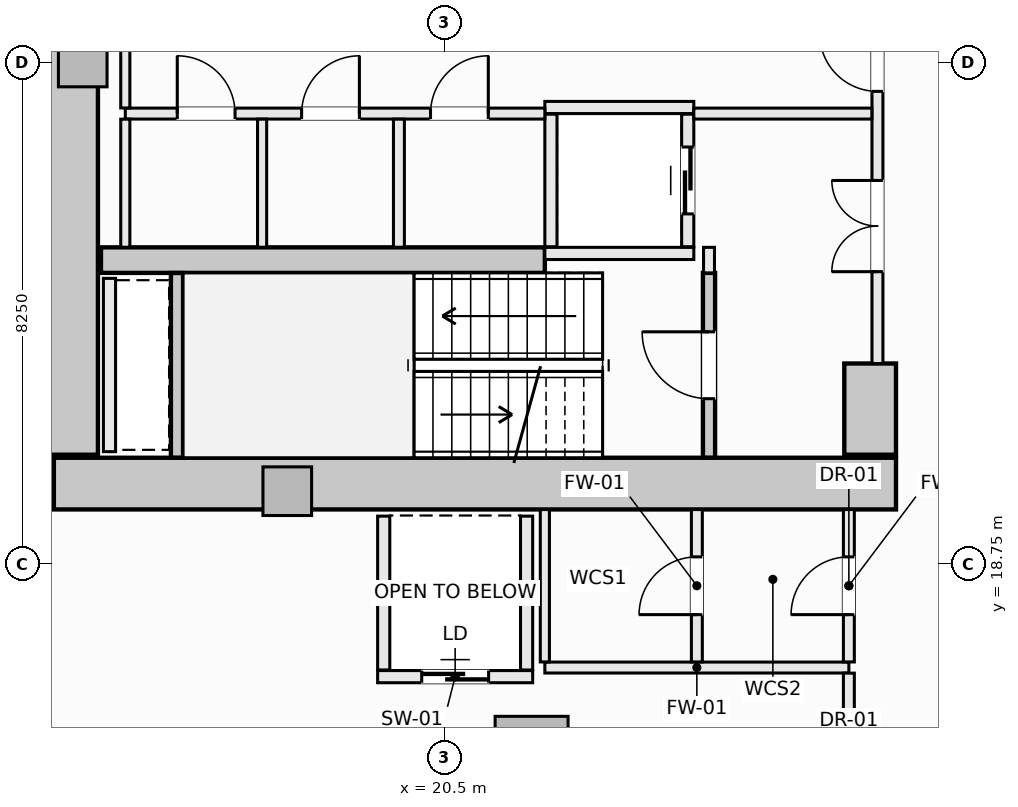
"""IFC4 building model, lengths in metres.
Left out: names, types, materials, properties, quantities, classifications, styles, units other than length and angle.
Written with IfcOpenShell. Run it as: python <this file> out.ifc"""

import sys

from ifc_helpers import new_model, si_unit, direction, frame, frame_2d, origin, origin_2d, place, context, subcontext, project, spatial, rectangle, extrude, element, fill, save


model = new_model("IFC4")
c1 = context("Model", 3, precision=1e-05, world=origin(), true_north=direction((0.0, 1.0)))
c2 = subcontext(c1, "Body", "Model", "MODEL_VIEW")
j1 = project(units=[si_unit("LENGTHUNIT", "METRE"), si_unit("PLANEANGLEUNIT", "RADIAN")], contexts=[c1])
p1 = place(None, origin())
s1 = spatial("IfcSite", under=j1, at=p1, CompositionType="ELEMENT")
p2 = place(p1, origin())
s2 = spatial("IfcBuilding", under=s1, at=p2, CompositionType="ELEMENT")
p3 = place(p2, frame((0.0, 0.0, 68.85)))
s3 = spatial("IfcBuildingStorey", under=s2, at=p3, CompositionType="ELEMENT", Elevation=68.85)
p4 = place(p3, frame((14.075, 20.075, -0.28), z_axis=(0.0, 0.0, 1.0), x_axis=(1.0, 0.0, 0.0)))
e1 = element("IfcWall", 1, at=p4, inside=s3, PredefinedType="SHEAR", context=c2, shape_type="SweptSolid", body=[
    extrude(rectangle(XDim=13.85, YDim=0.85, at=frame_2d((6.925, 0.0))), origin(), (0.0, 0.0, 1.0), 3.85),
])
p5 = place(p3, frame((14.375, 20.55, -0.28), z_axis=(0.0, 0.0, 1.0), x_axis=(0.0, 1.0, 0.0)))
e2 = element("IfcWall", 2, at=p5, inside=s3, PredefinedType="SHEAR", context=c2, shape_type="SweptSolid", body=[
    extrude(rectangle(XDim=12.9, YDim=0.85, at=frame_2d((6.45, 0.0))), origin(), (0.0, 0.0, 1.0), 3.85),
])
p6 = place(p3, frame((27.5, 20.55, -0.28), z_axis=(0.0, 0.0, 1.0), x_axis=(0.0, 1.0, 0.0)))
e3 = element("IfcWall", 3, at=p6, inside=s3, PredefinedType="SHEAR", context=c2, shape_type="SweptSolid", body=[
    extrude(rectangle(XDim=1.5, YDim=0.85, at=frame_2d((0.75, 0.0))), origin(), (0.0, 0.0, 1.0), 3.85),
])
p7 = place(p3, frame((14.85, 23.75, -0.28), z_axis=(0.0, 0.0, 1.0), x_axis=(1.0, 0.0, 0.0)))
e4 = element("IfcWall", 4, at=p7, inside=s3, PredefinedType="SHEAR", context=c2, shape_type="SweptSolid", body=[
    extrude(rectangle(XDim=7.3, YDim=0.42, at=frame_2d((3.65, 0.0))), origin(), (0.0, 0.0, 1.0), 3.85),
])
p8 = place(p3, frame((21.932, 15.648, -0.28), z_axis=(0.0, 0.0, 1.0), x_axis=(1.0, 0.0, 0.0)))
e5 = element("IfcColumn", 5, at=p8, inside=s3, PredefinedType="COLUMN", context=c2, shape_type="SweptSolid", body=[
    extrude(rectangle(XDim=1.2, YDim=1.2, at=origin_2d()), origin(), (0.0, 0.0, 1.0), 3.85),
])
for number, where, z_axis, x_axis in (
    (6, (14.55, 27.0, -0.28), (0.0, 0.0, 1.0), (1.0, 0.0, 0.0)),
    (7, (17.914, 19.95, -0.28), (0.0, 0.0, 1.0), (1.0, 0.0, 0.0)),
):
    element("IfcColumn", number, at=place(p3, frame(where, z_axis=z_axis, x_axis=x_axis)), inside=s3, PredefinedType="PILASTER", context=c2, shape_type="SweptSolid", body=[
        extrude(rectangle(XDim=0.8, YDim=0.8, at=origin_2d()), origin(), (0.0, 0.0, 1.0), 3.85),
    ])
p9 = place(p3, frame((24.85, 20.502, -0.28), z_axis=(0.0, 0.0, 1.0), x_axis=(0.0, 1.0, 0.0)))
e8 = element("IfcWall", 8, at=p9, inside=s3, PredefinedType="SHEAR", context=c2, shape_type="SweptSolid", body=[
    extrude(rectangle(XDim=3.038, YDim=0.2, at=frame_2d((1.519, 0.0))), origin(), (0.0, 0.0, 1.0), 3.85),
])
p10 = place(p9, frame((0.969, 0.0, 0.28)))
e9 = element("IfcOpeningElement", 9, at=p10, cuts=e8, PredefinedType="OPENING", context=c2, shape_type="SweptSolid", body=[
    extrude(rectangle(XDim=1.1, YDim=2.15, at=frame_2d((0.55, 1.075))), frame((0.0, 0.11, 0.0), z_axis=(0.0, -1.0, 0.0), x_axis=(1.0, 0.0, 0.0)), (0.0, 0.0, 1.0), 0.22),
])
p11 = place(p3, frame((16.1, 20.502, -0.28), z_axis=(0.0, 0.0, 1.0), x_axis=(0.0, 1.0, 0.0)))
e10 = element("IfcWall", 10, at=p11, inside=s3, PredefinedType="SHEAR", context=c2, shape_type="SweptSolid", body=[
    extrude(rectangle(XDim=3.036, YDim=0.2, at=frame_2d((1.518, 0.0))), origin(), (0.0, 0.0, 1.0), 3.85),
])
for number, where, z_axis, x_axis in (
    (11, (22.15, 26.26, 0.0), (0.0, 0.0, 1.0), (1.0, 0.0, 0.0)),
    (12, (22.15, 23.86, 0.0), (0.0, 0.0, 1.0), (1.0, 0.0, 0.0)),
):
    element("IfcWall", number, at=place(p3, frame(where, z_axis=z_axis, x_axis=x_axis)), inside=s3, PredefinedType="SOLIDWALL", context=c2, shape_type="SweptSolid", body=[
        extrude(rectangle(XDim=2.45, YDim=0.2, at=frame_2d((1.225, 0.0))), origin(), (0.0, 0.0, 1.0), 3.57),
    ])
p12 = place(p3, frame((22.25, 23.97, 0.0), z_axis=(0.0, 0.0, 1.0), x_axis=(0.0, 1.0, 0.0)))
e13 = element("IfcWall", 13, at=p12, inside=s3, PredefinedType="SOLIDWALL", context=c2, shape_type="SweptSolid", body=[
    extrude(rectangle(XDim=2.18, YDim=0.2, at=frame_2d((1.09, 0.0))), origin(), (0.0, 0.0, 1.0), 3.57),
])
p13 = place(p3, frame((24.5, 23.97, 0.0), z_axis=(0.0, 0.0, 1.0), x_axis=(0.0, 1.0, 0.0)))
e14 = element("IfcWall", 14, at=p13, inside=s3, PredefinedType="SOLIDWALL", context=c2, shape_type="SweptSolid", body=[
    extrude(rectangle(XDim=2.18, YDim=0.2, at=frame_2d((1.09, 0.0))), origin(), (0.0, 0.0, 1.0), 3.57),
])
p14 = place(p13, frame((0.54, 0.0, 0.0)))
e15 = element("IfcOpeningElement", 15, at=p14, cuts=e14, PredefinedType="OPENING", context=c2, shape_type="SweptSolid", body=[
    extrude(rectangle(XDim=1.1, YDim=2.2, at=frame_2d((0.55, 1.1))), frame((0.0, 0.11, 0.0), z_axis=(0.0, -1.0, 0.0), x_axis=(1.0, 0.0, 0.0)), (0.0, 0.0, 1.0), 0.22),
])
p15 = place(p3, frame((19.4, 16.9, 0.0), z_axis=(0.0, 0.0, 1.0), x_axis=(1.0, 0.0, 0.0)))
e16 = element("IfcWall", 16, at=p15, inside=s3, PredefinedType="SOLIDWALL", context=c2, shape_type="SweptSolid", body=[
    extrude(rectangle(XDim=2.55, YDim=0.2, at=frame_2d((1.275, 0.0))), origin(), (0.0, 0.0, 1.0), 3.57),
])
p16 = place(p15, frame((0.725, 0.0, 0.0)))
e17 = element("IfcOpeningElement", 17, at=p16, cuts=e16, PredefinedType="OPENING", context=c2, shape_type="SweptSolid", body=[
    extrude(rectangle(XDim=1.1, YDim=2.2, at=frame_2d((0.55, 1.1))), frame((0.0, 0.11, 0.0), z_axis=(0.0, -1.0, 0.0), x_axis=(1.0, 0.0, 0.0)), (0.0, 0.0, 1.0), 0.22),
])
for number, where, z_axis, x_axis in (
    (18, (19.5, 17.01, 0.0), (0.0, 0.0, 1.0), (0.0, 1.0, 0.0)),
    (19, (21.85, 17.01, 0.0), (0.0, 0.0, 1.0), (0.0, 1.0, 0.0)),
):
    element("IfcWall", number, at=place(p3, frame(where, z_axis=z_axis, x_axis=x_axis)), inside=s3, PredefinedType="SOLIDWALL", context=c2, shape_type="SweptSolid", body=[
        extrude(rectangle(XDim=2.53, YDim=0.2, at=frame_2d((1.265, 0.0))), origin(), (0.0, 0.0, 1.0), 3.57),
    ])
p17 = place(p3, frame((14.99, 20.6, 0.0), z_axis=(0.0, 0.0, 1.0), x_axis=(0.0, 1.0, 0.0)))
e20 = element("IfcWall", 20, at=p17, inside=s3, PredefinedType="SOLIDWALL", context=c2, shape_type="SweptSolid", body=[
    extrude(rectangle(XDim=2.85, YDim=0.2, at=frame_2d((1.425, 0.0))), origin(), (0.0, 0.0, 1.0), 3.57),
])
p18 = place(p3, frame((24.85, 23.54, 0.0), z_axis=(0.0, 0.0, 1.0), x_axis=(0.0, 1.0, 0.0)))
e21 = element("IfcWall", 21, at=p18, inside=s3, PredefinedType="SOLIDWALL", context=c2, shape_type="SweptSolid", body=[
    extrude(rectangle(XDim=0.42, YDim=0.18, at=frame_2d((0.21, 0.0))), origin(), (0.0, 0.0, 1.0), 3.57),
])
p19 = place(p3, frame((27.62, 22.05, 0.0), z_axis=(0.0, 0.0, 1.0), x_axis=(0.0, 1.0, 0.0)))
e22 = element("IfcWall", 22, at=p19, inside=s3, PredefinedType="SOLIDWALL", context=c2, shape_type="SweptSolid", body=[
    extrude(rectangle(XDim=9.9, YDim=0.18, at=frame_2d((4.95, 0.0))), origin(), (0.0, 0.0, 1.0), 2.662),
])
p20 = place(p19, frame((4.475, 0.0, 0.0)))
e23 = element("IfcOpeningElement", 23, at=p20, cuts=e22, PredefinedType="OPENING", context=c2, shape_type="SweptSolid", body=[
    extrude(rectangle(XDim=0.95, YDim=2.1, at=frame_2d((0.475, 1.05))), frame((0.0, 0.1, 0.0), z_axis=(0.0, -1.0, 0.0), x_axis=(1.0, 0.0, 0.0)), (0.0, 0.0, 1.0), 0.2),
])
p21 = place(p19, frame((6.89, 0.0, 0.0)))
e24 = element("IfcOpeningElement", 24, at=p21, cuts=e22, PredefinedType="OPENING", context=c2, shape_type="SweptSolid", body=[
    extrude(rectangle(XDim=1.5, YDim=2.2, at=frame_2d((0.75, 1.1))), frame((0.0, 0.1, 0.0), z_axis=(0.0, -1.0, 0.0), x_axis=(1.0, 0.0, 0.0)), (0.0, 0.0, 1.0), 0.2),
])
p22 = place(p19, frame((1.51, 0.0, 0.0)))
e25 = element("IfcOpeningElement", 25, at=p22, cuts=e22, PredefinedType="OPENING", context=c2, shape_type="SweptSolid", body=[
    extrude(rectangle(XDim=1.5, YDim=2.2, at=frame_2d((0.75, 1.1))), frame((0.0, 0.1, 0.0), z_axis=(0.0, -1.0, 0.0), x_axis=(1.0, 0.0, 0.0)), (0.0, 0.0, 1.0), 0.2),
])
p23 = place(p3, frame((15.25, 26.16, 0.0), z_axis=(0.0, 0.0, 1.0), x_axis=(1.0, 0.0, 0.0)))
e26 = element("IfcWall", 26, at=p23, inside=s3, PredefinedType="SOLIDWALL", context=c2, shape_type="SweptSolid", body=[
    extrude(rectangle(XDim=6.9, YDim=0.18, at=frame_2d((3.45, 0.0))), origin(), (0.0, 0.0, 1.0), 3.57),
])
p24 = place(p23, frame((5.02, 0.0, 0.0)))
e27 = element("IfcOpeningElement", 27, at=p24, cuts=e26, PredefinedType="OPENING", context=c2, shape_type="SweptSolid", body=[
    extrude(rectangle(XDim=0.95, YDim=2.1, at=frame_2d((0.475, 1.05))), frame((0.0, 0.1, 0.0), z_axis=(0.0, -1.0, 0.0), x_axis=(1.0, 0.0, 0.0)), (0.0, 0.0, 1.0), 0.2),
])
p25 = place(p23, frame((0.855, 0.0, 0.0)))
e28 = element("IfcOpeningElement", 28, at=p25, cuts=e26, PredefinedType="OPENING", context=c2, shape_type="SweptSolid", body=[
    extrude(rectangle(XDim=0.95, YDim=2.1, at=frame_2d((0.475, 1.05))), frame((0.0, 0.1, 0.0), z_axis=(0.0, -1.0, 0.0), x_axis=(1.0, 0.0, 0.0)), (0.0, 0.0, 1.0), 0.2),
])
p26 = place(p23, frame((2.9, 0.0, 0.0)))
e29 = element("IfcOpeningElement", 29, at=p26, cuts=e26, PredefinedType="OPENING", context=c2, shape_type="SweptSolid", body=[
    extrude(rectangle(XDim=0.95, YDim=2.1, at=frame_2d((0.475, 1.05))), frame((0.0, 0.1, 0.0), z_axis=(0.0, -1.0, 0.0), x_axis=(1.0, 0.0, 0.0)), (0.0, 0.0, 1.0), 0.2),
])
p27 = place(p3, frame((24.6, 26.16, 0.0), z_axis=(0.0, 0.0, 1.0), x_axis=(1.0, 0.0, 0.0)))
e30 = element("IfcWall", 30, at=p27, inside=s3, PredefinedType="SOLIDWALL", context=c2, shape_type="SweptSolid", body=[
    extrude(rectangle(XDim=2.928, YDim=0.18, at=frame_2d((1.464, 0.0))), origin(), (0.0, 0.0, 1.0), 3.57),
])
p28 = place(p3, frame((15.25, 23.962, 0.0), z_axis=(0.0, 0.0, 1.0), x_axis=(0.0, 1.0, 0.0)))
e31 = element("IfcWall", 31, at=p28, inside=s3, PredefinedType="PARTITIONING", context=c2, shape_type="SweptSolid", body=[
    extrude(rectangle(XDim=2.106, YDim=0.15, at=frame_2d((1.053, 0.0))), origin(), (0.0, 0.0, 1.0), 3.57),
])
p29 = place(p3, frame((15.25, 26.252, 0.0), z_axis=(0.0, 0.0, 1.0), x_axis=(0.0, 1.0, 0.0)))
e32 = element("IfcWall", 32, at=p29, inside=s3, PredefinedType="PARTITIONING", context=c2, shape_type="SweptSolid", body=[
    extrude(rectangle(XDim=1.496, YDim=0.15, at=frame_2d((0.748, 0.0))), origin(), (0.0, 0.0, 1.0), 3.57),
])
p30 = place(p3, frame((19.75, 23.962, 0.0), z_axis=(0.0, 0.0, 1.0), x_axis=(0.0, 1.0, 0.0)))
e33 = element("IfcWall", 33, at=p30, inside=s3, PredefinedType="SOLIDWALL", context=c2, shape_type="SweptSolid", body=[
    extrude(rectangle(XDim=2.106, YDim=0.18, at=frame_2d((1.053, 0.0))), origin(), (0.0, 0.0, 1.0), 3.57),
])
p31 = place(p3, frame((17.5, 23.962, 0.0), z_axis=(0.0, 0.0, 1.0), x_axis=(0.0, 1.0, 0.0)))
e34 = element("IfcWall", 34, at=p31, inside=s3, PredefinedType="PARTITIONING", context=c2, shape_type="SweptSolid", body=[
    extrude(rectangle(XDim=2.106, YDim=0.15, at=frame_2d((1.053, 0.0))), origin(), (0.0, 0.0, 1.0), 3.57),
])
p32 = place(p3, frame((22.15, 17.05, 0.0), z_axis=(0.0, 0.0, 1.0), x_axis=(1.0, 0.0, 0.0)))
e35 = element("IfcWall", 35, at=p32, inside=s3, PredefinedType="SOLIDWALL", context=c2, shape_type="SweptSolid", body=[
    extrude(rectangle(XDim=5.0, YDim=0.18, at=frame_2d((2.5, 0.0))), origin(), (0.0, 0.0, 1.0), 3.57),
])
p33 = place(p3, frame((22.15, 17.142, 0.0), z_axis=(0.0, 0.0, 1.0), x_axis=(0.0, 1.0, 0.0)))
e36 = element("IfcWall", 36, at=p33, inside=s3, PredefinedType="PARTITIONING", context=c2, shape_type="SweptSolid", body=[
    extrude(rectangle(XDim=2.506, YDim=0.15, at=frame_2d((1.253, 0.0))), origin(), (0.0, 0.0, 1.0), 3.57),
])
p34 = place(p3, frame((24.65, 17.142, 0.0), z_axis=(0.0, 0.0, 1.0), x_axis=(0.0, 1.0, 0.0)))
e37 = element("IfcWall", 37, at=p34, inside=s3, PredefinedType="SOLIDWALL", context=c2, shape_type="SweptSolid", body=[
    extrude(rectangle(XDim=2.506, YDim=0.18, at=frame_2d((1.253, 0.0))), origin(), (0.0, 0.0, 1.0), 3.57),
])
p35 = place(p34, frame((0.778, 0.0, 0.0)))
e38 = element("IfcOpeningElement", 38, at=p35, cuts=e37, PredefinedType="OPENING", context=c2, shape_type="SweptSolid", body=[
    extrude(rectangle(XDim=0.95, YDim=2.1, at=frame_2d((0.475, 1.05))), frame((0.0, 0.1, 0.0), z_axis=(0.0, -1.0, 0.0), x_axis=(1.0, 0.0, 0.0)), (0.0, 0.0, 1.0), 0.2),
])
p36 = place(p3, frame((27.15, 11.75, 0.0), z_axis=(0.0, 0.0, 1.0), x_axis=(0.0, 1.0, 0.0)))
e39 = element("IfcWall", 39, at=p36, inside=s3, PredefinedType="SOLIDWALL", context=c2, shape_type="SweptSolid", body=[
    extrude(rectangle(XDim=5.208, YDim=0.18, at=frame_2d((2.604, 0.0))), origin(), (0.0, 0.0, 1.0), 3.57),
])
p37 = place(p36, frame((2.129, 0.0, 0.0)))
e40 = element("IfcOpeningElement", 40, at=p37, cuts=e39, PredefinedType="OPENING", context=c2, shape_type="SweptSolid", body=[
    extrude(rectangle(XDim=0.95, YDim=2.1, at=frame_2d((0.475, 1.05))), frame((0.0, 0.1, 0.0), z_axis=(0.0, -1.0, 0.0), x_axis=(1.0, 0.0, 0.0)), (0.0, 0.0, 1.0), 0.2),
])
p38 = place(p3, frame((27.15, 17.142, 0.0), z_axis=(0.0, 0.0, 1.0), x_axis=(0.0, 1.0, 0.0)))
e41 = element("IfcWall", 41, at=p38, inside=s3, PredefinedType="SOLIDWALL", context=c2, shape_type="SweptSolid", body=[
    extrude(rectangle(XDim=2.506, YDim=0.18, at=frame_2d((1.253, 0.0))), origin(), (0.0, 0.0, 1.0), 3.57),
])
p39 = place(p38, frame((0.778, 0.0, 0.0)))
e42 = element("IfcOpeningElement", 42, at=p39, cuts=e41, PredefinedType="OPENING", context=c2, shape_type="SweptSolid", body=[
    extrude(rectangle(XDim=0.95, YDim=2.1, at=frame_2d((0.475, 1.05))), frame((0.0, 0.1, 0.0), z_axis=(0.0, -1.0, 0.0), x_axis=(1.0, 0.0, 0.0)), (0.0, 0.0, 1.0), 0.2),
])
p40 = place(p10, origin())
e43 = element("IfcDoor", 43, at=p40, inside=s3, OperationType="SINGLE_SWING_RIGHT", PredefinedType="DOOR", context=c2, shape_type="SweptSolid", body=[
    extrude(rectangle(XDim=1.1, YDim=2.15, at=frame_2d((0.55, 1.075))), frame((0.0, 0.025, 0.0), z_axis=(0.0, -1.0, 0.0), x_axis=(1.0, 0.0, 0.0)), (0.0, 0.0, 1.0), 0.05),
])
fill(e9, e43)
p41 = place(p14, origin())
e44 = element("IfcDoor", 44, at=p41, inside=s3, OperationType="SLIDING_TO_LEFT", PredefinedType="DOOR", context=c2, shape_type="SweptSolid", body=[
    extrude(rectangle(XDim=1.1, YDim=2.2, at=frame_2d((0.55, 1.1))), frame((0.0, 0.025, 0.0), z_axis=(0.0, -1.0, 0.0), x_axis=(1.0, 0.0, 0.0)), (0.0, 0.0, 1.0), 0.05),
])
fill(e15, e44)
p42 = place(p16, origin())
e45 = element("IfcDoor", 45, at=p42, inside=s3, OperationType="SLIDING_TO_LEFT", PredefinedType="DOOR", context=c2, shape_type="SweptSolid", body=[
    extrude(rectangle(XDim=1.1, YDim=2.2, at=frame_2d((0.55, 1.1))), frame((0.0, 0.025, 0.0), z_axis=(0.0, -1.0, 0.0), x_axis=(1.0, 0.0, 0.0)), (0.0, 0.0, 1.0), 0.05),
])
fill(e17, e45)
p43 = place(p20, origin())
e46 = element("IfcDoor", 46, at=p43, inside=s3, OperationType="SINGLE_SWING_RIGHT", PredefinedType="DOOR", context=c2, shape_type="SweptSolid", body=[
    extrude(rectangle(XDim=0.95, YDim=2.1, at=frame_2d((0.475, 1.05))), frame((0.0, 0.025, 0.0), z_axis=(0.0, -1.0, 0.0), x_axis=(1.0, 0.0, 0.0)), (0.0, 0.0, 1.0), 0.05),
])
fill(e23, e46)
p44 = place(p22, origin())
e47 = element("IfcDoor", 47, at=p44, inside=s3, OperationType="DOUBLE_DOOR_SINGLE_SWING", PredefinedType="DOOR", context=c2, shape_type="SweptSolid", body=[
    extrude(rectangle(XDim=1.5, YDim=2.2, at=frame_2d((0.75, 1.1))), frame((0.0, 0.025, 0.0), z_axis=(0.0, -1.0, 0.0), x_axis=(1.0, 0.0, 0.0)), (0.0, 0.0, 1.0), 0.05),
])
fill(e25, e47)
p45 = place(p24, origin())
e48 = element("IfcDoor", 48, at=p45, inside=s3, OperationType="SINGLE_SWING_RIGHT", PredefinedType="DOOR", context=c2, shape_type="SweptSolid", body=[
    extrude(rectangle(XDim=0.95, YDim=2.1, at=frame_2d((0.475, 1.05))), frame((0.0, 0.025, 0.0), z_axis=(0.0, -1.0, 0.0), x_axis=(1.0, 0.0, 0.0)), (0.0, 0.0, 1.0), 0.05),
])
fill(e27, e48)
p46 = place(p25, origin())
e49 = element("IfcDoor", 49, at=p46, inside=s3, OperationType="SINGLE_SWING_LEFT", PredefinedType="DOOR", context=c2, shape_type="SweptSolid", body=[
    extrude(rectangle(XDim=0.95, YDim=2.1, at=frame_2d((0.475, 1.05))), frame((0.0, 0.025, 0.0), z_axis=(0.0, -1.0, 0.0), x_axis=(1.0, 0.0, 0.0)), (0.0, 0.0, 1.0), 0.05),
])
fill(e28, e49)
p47 = place(p26, origin())
e50 = element("IfcDoor", 50, at=p47, inside=s3, OperationType="SINGLE_SWING_RIGHT", PredefinedType="DOOR", context=c2, shape_type="SweptSolid", body=[
    extrude(rectangle(XDim=0.95, YDim=2.1, at=frame_2d((0.475, 1.05))), frame((0.0, 0.025, 0.0), z_axis=(0.0, -1.0, 0.0), x_axis=(1.0, 0.0, 0.0)), (0.0, 0.0, 1.0), 0.05),
])
fill(e29, e50)
p48 = place(p39, origin())
e51 = element("IfcDoor", 51, at=p48, inside=s3, OperationType="SINGLE_SWING_LEFT", PredefinedType="DOOR", context=c2, shape_type="SweptSolid", body=[
    extrude(rectangle(XDim=0.95, YDim=2.1, at=frame_2d((0.475, 1.05))), frame((0.0, 0.025, 0.0), z_axis=(0.0, -1.0, 0.0), x_axis=(1.0, 0.0, 0.0)), (0.0, 0.0, 1.0), 0.05),
])
fill(e42, e51)
p49 = place(p35, origin())
e52 = element("IfcDoor", 52, at=p49, inside=s3, OperationType="SINGLE_SWING_LEFT", PredefinedType="DOOR", context=c2, shape_type="SweptSolid", body=[
    extrude(rectangle(XDim=0.95, YDim=2.1, at=frame_2d((0.475, 1.05))), frame((0.0, 0.025, 0.0), z_axis=(0.0, -1.0, 0.0), x_axis=(1.0, 0.0, 0.0)), (0.0, 0.0, 1.0), 0.05),
])
fill(e38, e52)
save(model, sys.argv[1])
